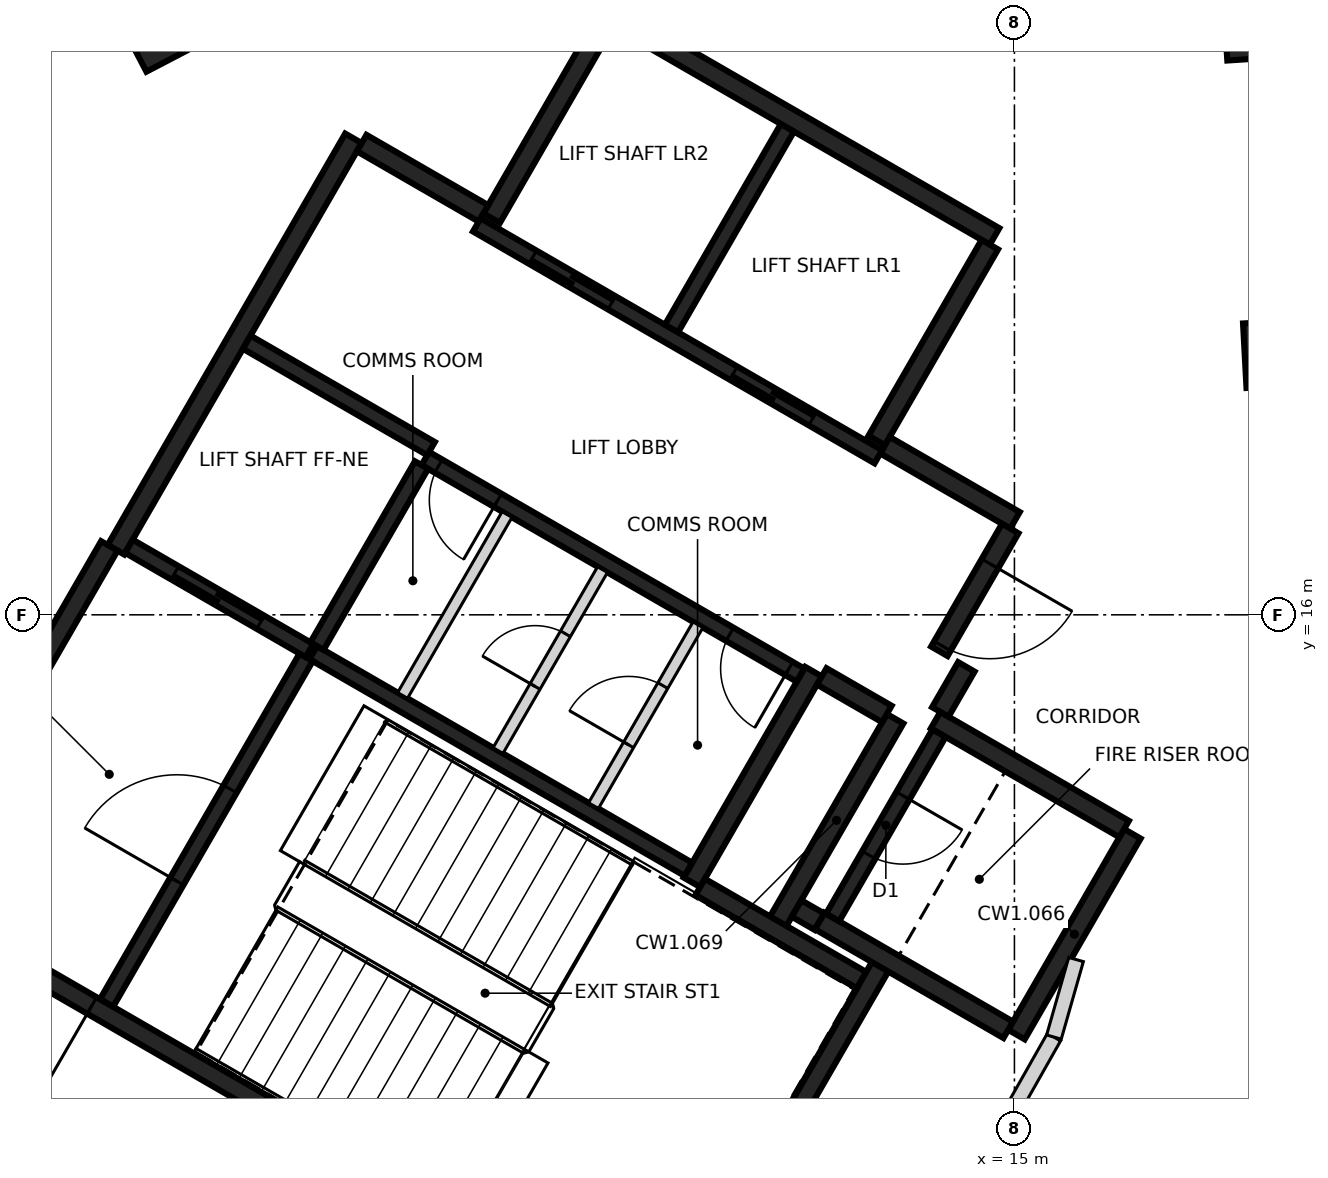
"""IFC4 building model, lengths in metres.
Left out: names, types, materials, properties, quantities, classifications, styles, units other than length and angle.
Written with IfcOpenShell. Run it as: python <this file> out.ifc"""

import sys

from ifc_helpers import new_model, si_unit, direction, frame, frame_2d, origin, origin_2d, place, context, subcontext, project, spatial, rectangle, extrude, element, fill, save


model = new_model("IFC4")
c1 = context("Model", 3, precision=1e-05, world=origin(), true_north=direction((0.0, 1.0)))
c2 = subcontext(c1, "Body", "Model", "MODEL_VIEW")
j1 = project(units=[si_unit("LENGTHUNIT", "METRE"), si_unit("PLANEANGLEUNIT", "RADIAN")], contexts=[c1])
p1 = place(None, origin())
s1 = spatial("IfcSite", under=j1, at=p1, CompositionType="ELEMENT")
p2 = place(p1, origin())
s2 = spatial("IfcBuilding", under=s1, at=p2, CompositionType="ELEMENT")
p3 = place(p2, frame((0.0, 0.0, 139.6)))
s3 = spatial("IfcBuildingStorey", under=s2, at=p3, CompositionType="ELEMENT", Elevation=139.6)
for number, where, z_axis, x_axis in (
    (1, (18.655, 19.442, -0.4), (0.0, 0.0, 1.0), (0.999, 0.054, 0.0)),
    (2, (18.397, 23.757, -0.4), (0.0, 0.0, 1.0), (0.998, 0.065, 0.0)),
    (3, (3.667, 23.896, -0.4), (0.0, 0.0, 1.0), (-0.463, 0.886, 0.0)),
):
    element("IfcColumn", number, at=place(p3, frame(where, z_axis=z_axis, x_axis=x_axis)), inside=s3, PredefinedType="COLUMN", context=c2, shape_type="SweptSolid", body=[
        extrude(rectangle(XDim=1.25, YDim=0.85, at=origin_2d()), origin(), (0.0, 0.0, 1.0), 3.6),
    ])
p4 = place(p3, frame((10.42, 6.498, 0.0), z_axis=(0.0, 0.0, 1.0), x_axis=(-0.866021906294, 0.500006057782, 0.0)))
e4 = element("IfcWall", 4, at=p4, inside=s3, PredefinedType="SHEAR", context=c2, shape_type="SweptSolid", body=[
    extrude(rectangle(XDim=11.55, YDim=0.25, at=frame_2d((5.775, 0.0))), origin(), (0.0, 0.0, 1.0), 3.2),
])
p5 = place(p4, frame((10.025, 0.0, 0.0)))
e5 = element("IfcOpeningElement", 5, at=p5, cuts=e4, PredefinedType="OPENING", context=c2, shape_type="SweptSolid", body=[
    extrude(rectangle(XDim=1.2, YDim=2.1, at=frame_2d((0.6, 1.05))), frame((0.0, 0.135, 0.0), z_axis=(0.0, -1.0, 0.0), x_axis=(1.0, 0.0, 0.0)), (0.0, 0.0, 1.0), 0.27),
])
p6 = place(p4, frame((8.725, 0.0, 0.0)))
e6 = element("IfcOpeningElement", 6, at=p6, cuts=e4, PredefinedType="OPENING", context=c2, shape_type="SweptSolid", body=[
    extrude(rectangle(XDim=1.2, YDim=2.1, at=frame_2d((0.6, 1.05))), frame((0.0, 0.135, 0.0), z_axis=(0.0, -1.0, 0.0), x_axis=(1.0, 0.0, 0.0)), (0.0, 0.0, 1.0), 0.27),
])
p7 = place(p3, frame((3.179, 16.856, 0.0), z_axis=(0.0, 0.0, 1.0), x_axis=(0.500004234368, 0.866022959057, 0.0)))
e7 = element("IfcWall", 7, at=p7, inside=s3, PredefinedType="SHEAR", context=c2, shape_type="SweptSolid", body=[
    extrude(rectangle(XDim=6.25, YDim=0.25, at=frame_2d((3.125, 0.0))), origin(), (0.0, 0.0, 1.0), 3.2),
])
p8 = place(p3, frame((9.673, 23.903, 0.0), z_axis=(0.0, 0.0, 1.0), x_axis=(0.86603616409, -0.499981362141, 0.0)))
e8 = element("IfcWall", 8, at=p8, inside=s3, PredefinedType="SHEAR", context=c2, shape_type="SweptSolid", body=[
    extrude(rectangle(XDim=5.85, YDim=0.25, at=frame_2d((2.925, 0.0))), origin(), (0.0, 0.0, 1.0), 3.2),
])
p9 = place(p3, frame((0.48, 12.381, 0.0), z_axis=(0.0, 0.0, 1.0), x_axis=(0.49999885962, 0.866026062182, 0.0)))
e9 = element("IfcWall", 9, at=p9, inside=s3, PredefinedType="SHEAR", context=c2, shape_type="SweptSolid", body=[
    extrude(rectangle(XDim=5.225, YDim=0.25, at=frame_2d((2.612, 0.0))), origin(), (0.0, 0.0, 1.0), 3.2),
])
p10 = place(p3, frame((13.238, 11.378, 0.0), z_axis=(0.0, 0.0, 1.0), x_axis=(-0.500008851346, -0.866020293397, 0.0)))
e10 = element("IfcWall", 10, at=p10, inside=s3, PredefinedType="SHEAR", context=c2, shape_type="SweptSolid", body=[
    extrude(rectangle(XDim=5.51, YDim=0.25, at=frame_2d((2.755, 0.0))), origin(), (0.0, 0.0, 1.0), 3.2),
])
p11 = place(p3, frame((12.357, 15.252, 0.0), z_axis=(0.0, 0.0, 1.0), x_axis=(-0.500028443584, -0.866008981251, 0.0)))
e11 = element("IfcWall", 11, at=p11, inside=s3, PredefinedType="SHEAR", context=c2, shape_type="SweptSolid", body=[
    extrude(rectangle(XDim=3.2, YDim=0.25, at=frame_2d((1.6, 0.0))), origin(), (0.0, 0.0, 1.0), 3.2),
])
for number, where, z_axis, x_axis in (
    (12, (8.123, 21.219, 0.0), (0.0, 0.0, 1.0), (0.5, 0.866, 0.0)),
    (13, (14.676, 20.87, 0.0), (0.0, 0.0, 1.0), (-0.5, -0.866, 0.0)),
):
    element("IfcWall", number, at=place(p3, frame(where, z_axis=z_axis, x_axis=x_axis)), inside=s3, PredefinedType="SHEAR", context=c2, shape_type="SweptSolid", body=[
        extrude(rectangle(XDim=2.975, YDim=0.25, at=frame_2d((1.487, 0.0))), origin(), (0.0, 0.0, 1.0), 3.2),
    ])
p12 = place(p3, frame((16.552, 13.119, 0.0), z_axis=(0.0, 0.0, 1.0), x_axis=(-0.499978833458, -0.866037623948, 0.0)))
e14 = element("IfcWall", 14, at=p12, inside=s3, PredefinedType="SHEAR", context=c2, shape_type="SweptSolid", body=[
    extrude(rectangle(XDim=3.05, YDim=0.25, at=frame_2d((1.525, 0.0))), origin(), (0.0, 0.0, 1.0), 3.2),
])
p13 = place(p3, frame((14.918, 10.54, 0.0), z_axis=(0.0, 0.0, 1.0), x_axis=(-0.866063538972, 0.499933942099, 0.0)))
e15 = element("IfcWall", 15, at=p13, inside=s3, PredefinedType="SHEAR", context=c2, shape_type="SweptSolid", body=[
    extrude(rectangle(XDim=2.865, YDim=0.25, at=frame_2d((1.432, 0.0))), origin(), (0.0, 0.0, 1.0), 3.2),
])
p14 = place(p3, frame((13.963, 14.614, 0.0), z_axis=(0.0, 0.0, 1.0), x_axis=(0.866042235819, -0.499970844928, 0.0)))
e16 = element("IfcWall", 16, at=p14, inside=s3, PredefinedType="SHEAR", context=c2, shape_type="SweptSolid", body=[
    extrude(rectangle(XDim=2.865, YDim=0.25, at=frame_2d((1.432, 0.0))), origin(), (0.0, 0.0, 1.0), 3.2),
])
p15 = place(p3, frame((11.888, 11.961, 0.0), z_axis=(0.0, 0.0, 1.0), x_axis=(0.500003324108, 0.866023484601, 0.0)))
e17 = element("IfcWall", 17, at=p15, inside=s3, PredefinedType="SHEAR", context=c2, shape_type="SweptSolid", body=[
    extrude(rectangle(XDim=3.085, YDim=0.25, at=frame_2d((1.542, 0.0))), origin(), (0.0, 0.0, 1.0), 3.2),
])
p16 = place(p3, frame((10.865, 12.418, 0.0), z_axis=(0.0, 0.0, 1.0), x_axis=(0.866026229868, -0.499998569178, 0.0)))
e18 = element("IfcWall", 18, at=p16, inside=s3, PredefinedType="SHEAR", context=c2, shape_type="SweptSolid", body=[
    extrude(rectangle(XDim=2.449, YDim=0.25, at=frame_2d((1.225, 0.0))), origin(), (0.0, 0.0, 1.0), 3.2),
])
p17 = place(p3, frame((13.297, 18.231, 0.0), z_axis=(0.0, 0.0, 1.0), x_axis=(0.866043531843, -0.499968599967, 0.0)))
e19 = element("IfcWall", 19, at=p17, inside=s3, PredefinedType="SHEAR", context=c2, shape_type="SweptSolid", body=[
    extrude(rectangle(XDim=1.975, YDim=0.25, at=frame_2d((0.987, 0.0))), origin(), (0.0, 0.0, 1.0), 3.2),
])
p18 = place(p3, frame((6.413, 22.206, 0.0), z_axis=(0.0, 0.0, 1.0), x_axis=(0.866016279763, -0.500015802937, 0.0)))
e20 = element("IfcWall", 20, at=p18, inside=s3, PredefinedType="SHEAR", context=c2, shape_type="SweptSolid", body=[
    extrude(rectangle(XDim=1.849, YDim=0.25, at=frame_2d((0.925, 0.0))), origin(), (0.0, 0.0, 1.0), 3.2),
])
p19 = place(p3, frame((14.945, 17.135, 0.0), z_axis=(0.0, 0.0, 1.0), x_axis=(-0.499983108224, -0.866035156036, 0.0)))
e21 = element("IfcWall", 21, at=p19, inside=s3, PredefinedType="SHEAR", context=c2, shape_type="SweptSolid", body=[
    extrude(rectangle(XDim=1.865, YDim=0.25, at=frame_2d((0.932, 0.0))), origin(), (0.0, 0.0, 1.0), 3.2),
])
p20 = place(p19, frame((0.535, 0.0, 0.0)))
e22 = element("IfcOpeningElement", 22, at=p20, cuts=e21, PredefinedType="OPENING", context=c2, shape_type="SweptSolid", body=[
    extrude(rectangle(XDim=1.25, YDim=2.1, at=frame_2d((0.625, 1.05))), frame((0.0, 0.135, 0.0), z_axis=(0.0, -1.0, 0.0), x_axis=(1.0, 0.0, 0.0)), (0.0, 0.0, 1.0), 0.27),
])
p21 = place(p3, frame((13.322, 14.695, 0.0), z_axis=(0.0, 0.0, 1.0), x_axis=(-0.866017078145, 0.500014420154, 0.0)))
e23 = element("IfcWall", 23, at=p21, inside=s3, PredefinedType="SHEAR", context=c2, shape_type="SweptSolid", body=[
    extrude(rectangle(XDim=0.989, YDim=0.25, at=frame_2d((0.495, 0.0))), origin(), (0.0, 0.0, 1.0), 3.2),
])
p22 = place(p3, frame((14.368, 15.315, 0.0), z_axis=(0.0, 0.0, 1.0), x_axis=(-0.499897359611, -0.866084655132, 0.0)))
e24 = element("IfcWall", 24, at=p22, inside=s3, PredefinedType="SHEAR", context=c2, shape_type="SweptSolid", body=[
    extrude(rectangle(XDim=0.685, YDim=0.25, at=frame_2d((0.342, 0.0))), origin(), (0.0, 0.0, 1.0), 3.2),
])
p23 = place(p3, frame((12.433, 11.964, 0.0), z_axis=(0.0, 0.0, 1.0), x_axis=(-0.866055875208, 0.499947218231, 0.0)))
e25 = element("IfcWall", 25, at=p23, inside=s3, PredefinedType="SHEAR", context=c2, shape_type="SweptSolid", body=[
    extrude(rectangle(XDim=0.345, YDim=0.25, at=frame_2d((0.172, 0.0))), origin(), (0.0, 0.0, 1.0), 3.2),
])
p24 = place(p3, frame((13.21, 18.08, 0.0), z_axis=(0.0, 0.0, 1.0), x_axis=(-0.866030299012, 0.499991521122, 0.0)))
e26 = element("IfcWall", 26, at=p24, inside=s3, PredefinedType="SHEAR", context=c2, shape_type="SweptSolid", body=[
    extrude(rectangle(XDim=6.1, YDim=0.2, at=frame_2d((3.05, 0.0))), origin(), (0.0, 0.0, 1.0), 3.2),
])
p25 = place(p24, frame((1.0, 0.0, 0.0)))
e27 = element("IfcOpeningElement", 27, at=p25, cuts=e26, PredefinedType="OPENING", context=c2, shape_type="SweptSolid", body=[
    extrude(rectangle(XDim=1.2, YDim=2.1, at=frame_2d((0.6, 1.05))), frame((0.0, 0.11, 0.0), z_axis=(0.0, -1.0, 0.0), x_axis=(1.0, 0.0, 0.0)), (0.0, 0.0, 1.0), 0.22),
])
p26 = place(p24, frame((4.05, 0.0, 0.0)))
e28 = element("IfcOpeningElement", 28, at=p26, cuts=e26, PredefinedType="OPENING", context=c2, shape_type="SweptSolid", body=[
    extrude(rectangle(XDim=1.2, YDim=2.1, at=frame_2d((0.6, 1.05))), frame((0.0, 0.11, 0.0), z_axis=(0.0, -1.0, 0.0), x_axis=(1.0, 0.0, 0.0)), (0.0, 0.0, 1.0), 0.22),
])
p27 = place(p3, frame((5.775, 15.502, 0.0), z_axis=(0.0, 0.0, 1.0), x_axis=(0.866020080793, -0.500009219579, 0.0)))
e29 = element("IfcWall", 29, at=p27, inside=s3, PredefinedType="SHEAR", context=c2, shape_type="SweptSolid", body=[
    extrude(rectangle(XDim=5.699, YDim=0.2, at=frame_2d((2.85, 0.0))), origin(), (0.0, 0.0, 1.0), 3.2),
])
p28 = place(p3, frame((12.185, 15.207, 0.0), z_axis=(0.0, 0.0, 1.0), x_axis=(-0.866020080793, 0.500009219579, 0.0)))
e30 = element("IfcWall", 30, at=p28, inside=s3, PredefinedType="SHEAR", context=c2, shape_type="SweptSolid", body=[
    extrude(rectangle(XDim=5.699, YDim=0.2, at=frame_2d((2.85, 0.0))), origin(), (0.0, 0.0, 1.0), 3.2),
])
p29 = place(p28, frame((0.174, 0.0, 0.0)))
e31 = element("IfcOpeningElement", 31, at=p29, cuts=e30, PredefinedType="OPENING", context=c2, shape_type="SweptSolid", body=[
    extrude(rectangle(XDim=0.9, YDim=2.1, at=frame_2d((0.45, 1.05))), frame((0.0, 0.11, 0.0), z_axis=(0.0, -1.0, 0.0), x_axis=(1.0, 0.0, 0.0)), (0.0, 0.0, 1.0), 0.22),
])
p30 = place(p28, frame((4.599, 0.0, 0.0)))
e32 = element("IfcOpeningElement", 32, at=p30, cuts=e30, PredefinedType="OPENING", context=c2, shape_type="SweptSolid", body=[
    extrude(rectangle(XDim=0.9, YDim=2.1, at=frame_2d((0.45, 1.05))), frame((0.0, 0.11, 0.0), z_axis=(0.0, -1.0, 0.0), x_axis=(1.0, 0.0, 0.0)), (0.0, 0.0, 1.0), 0.22),
])
p31 = place(p3, frame((3.057, 10.895, 0.0), z_axis=(0.0, 0.0, 1.0), x_axis=(0.499989418164, 0.866031513124, 0.0)))
e33 = element("IfcWall", 33, at=p31, inside=s3, PredefinedType="SHEAR", context=c2, shape_type="SweptSolid", body=[
    extrude(rectangle(XDim=5.251, YDim=0.2, at=frame_2d((2.625, 0.0))), origin(), (0.0, 0.0, 1.0), 3.2),
])
p32 = place(p31, frame((1.849, 0.0, 0.0)))
e34 = element("IfcOpeningElement", 34, at=p32, cuts=e33, PredefinedType="OPENING", context=c2, shape_type="SweptSolid", body=[
    extrude(rectangle(XDim=1.4, YDim=2.1, at=frame_2d((0.7, 1.05))), frame((0.0, 0.11, 0.0), z_axis=(0.0, -1.0, 0.0), x_axis=(1.0, 0.0, 0.0)), (0.0, 0.0, 1.0), 0.22),
])
p33 = place(p3, frame((10.489, 19.767, 0.0), z_axis=(0.0, 0.0, 1.0), x_axis=(0.499946628782, 0.866056215479, 0.0)))
e35 = element("IfcWall", 35, at=p33, inside=s3, PredefinedType="SHEAR", context=c2, shape_type="SweptSolid", body=[
    extrude(rectangle(XDim=3.048, YDim=0.2, at=frame_2d((1.524, 0.0))), origin(), (0.0, 0.0, 1.0), 3.2),
])
p34 = place(p3, frame((14.008, 14.442, 0.0), z_axis=(0.0, 0.0, 1.0), x_axis=(-0.499986818241, -0.866033014143, 0.0)))
e36 = element("IfcWall", 36, at=p34, inside=s3, PredefinedType="SHEAR", context=c2, shape_type="SweptSolid", body=[
    extrude(rectangle(XDim=2.798, YDim=0.2, at=frame_2d((1.399, 0.0))), origin(), (0.0, 0.0, 1.0), 3.2),
])
p35 = place(p34, frame((0.949, 0.0, 0.0)))
e37 = element("IfcOpeningElement", 37, at=p35, cuts=e36, PredefinedType="OPENING", context=c2, shape_type="SweptSolid", body=[
    extrude(rectangle(XDim=0.9, YDim=2.1, at=frame_2d((0.45, 1.05))), frame((0.0, 0.11, 0.0), z_axis=(0.0, -1.0, 0.0), x_axis=(1.0, 0.0, 0.0)), (0.0, 0.0, 1.0), 0.22),
])
p36 = place(p3, frame((7.199, 17.97, 0.0), z_axis=(0.0, 0.0, 1.0), x_axis=(-0.499968400327, -0.866043647095, 0.0)))
e38 = element("IfcWall", 38, at=p36, inside=s3, PredefinedType="SHEAR", context=c2, shape_type="SweptSolid", body=[
    extrude(rectangle(XDim=2.75, YDim=0.2, at=frame_2d((1.375, 0.0))), origin(), (0.0, 0.0, 1.0), 3.2),
])
p37 = place(p3, frame((5.725, 15.531, 0.0), z_axis=(0.0, 0.0, 1.0), x_axis=(-0.866037306777, 0.499979382845, 0.0)))
e39 = element("IfcWall", 39, at=p37, inside=s3, PredefinedType="SHEAR", context=c2, shape_type="SweptSolid", body=[
    extrude(rectangle(XDim=2.742, YDim=0.2, at=frame_2d((1.371, 0.0))), origin(), (0.0, 0.0, 1.0), 3.2),
])
p38 = place(p37, frame((0.743, 0.0, 0.0)))
e40 = element("IfcOpeningElement", 40, at=p38, cuts=e39, PredefinedType="OPENING", context=c2, shape_type="SweptSolid", body=[
    extrude(rectangle(XDim=1.3, YDim=2.1, at=frame_2d((0.65, 1.05))), frame((0.0, 0.11, 0.0), z_axis=(0.0, -1.0, 0.0), x_axis=(1.0, 0.0, 0.0)), (0.0, 0.0, 1.0), 0.22),
])
p39 = place(p3, frame((4.901, 19.586, 0.0), z_axis=(0.0, 0.0, 1.0), x_axis=(0.866022890907, -0.500004352405, 0.0)))
e41 = element("IfcWall", 41, at=p39, inside=s3, PredefinedType="SHEAR", context=c2, shape_type="SweptSolid", body=[
    extrude(rectangle(XDim=2.799, YDim=0.2, at=frame_2d((1.399, 0.0))), origin(), (0.0, 0.0, 1.0), 3.2),
])
p40 = place(p3, frame((9.462, 13.489, 0.0), z_axis=(0.0, 0.0, 1.0), x_axis=(0.50002746344, 0.86600954718, 0.0)))
e42 = element("IfcWall", 42, at=p40, inside=s3, PredefinedType="PARTITIONING", context=c2, shape_type="SweptSolid", body=[
    extrude(rectangle(XDim=2.748, YDim=0.15, at=frame_2d((1.374, 0.0))), origin(), (0.0, 0.0, 1.0), 3.2),
])
p41 = place(p40, frame((0.924, 0.0, 0.0)))
e43 = element("IfcOpeningElement", 43, at=p41, cuts=e42, PredefinedType="OPENING", context=c2, shape_type="SweptSolid", body=[
    extrude(rectangle(XDim=0.9, YDim=2.1, at=frame_2d((0.45, 1.05))), frame((0.0, 0.085, 0.0), z_axis=(0.0, -1.0, 0.0), x_axis=(1.0, 0.0, 0.0)), (0.0, 0.0, 1.0), 0.17),
])
p42 = place(p3, frame((8.207, 14.214, 0.0), z_axis=(0.0, 0.0, 1.0), x_axis=(0.499922376475, 0.866070215109, 0.0)))
e44 = element("IfcWall", 44, at=p42, inside=s3, PredefinedType="PARTITIONING", context=c2, shape_type="SweptSolid", body=[
    extrude(rectangle(XDim=2.749, YDim=0.15, at=frame_2d((1.374, 0.0))), origin(), (0.0, 0.0, 1.0), 3.2),
])
p43 = place(p42, frame((0.974, 0.0, 0.0)))
e45 = element("IfcOpeningElement", 45, at=p43, cuts=e44, PredefinedType="OPENING", context=c2, shape_type="SweptSolid", body=[
    extrude(rectangle(XDim=0.8, YDim=2.1, at=frame_2d((0.4, 1.05))), frame((0.0, 0.085, 0.0), z_axis=(0.0, -1.0, 0.0), x_axis=(1.0, 0.0, 0.0)), (0.0, 0.0, 1.0), 0.17),
])
p44 = place(p3, frame((6.951, 14.939, 0.0), z_axis=(0.0, 0.0, 1.0), x_axis=(0.50002746344, 0.86600954718, 0.0)))
e46 = element("IfcWall", 46, at=p44, inside=s3, PredefinedType="PARTITIONING", context=c2, shape_type="SweptSolid", body=[
    extrude(rectangle(XDim=2.748, YDim=0.15, at=frame_2d((1.374, 0.0))), origin(), (0.0, 0.0, 1.0), 3.2),
])
p45 = place(p3, frame((12.433, 4.992, 0.0), z_axis=(0.0, 0.0, 1.0), x_axis=(0.492740203499, 0.870176471675, 0.0)))
e47 = element("IfcWall", 47, at=p45, inside=s3, PredefinedType="PARTITIONING", context=c2, shape_type="SweptSolid", body=[
    extrude(rectangle(XDim=6.265, YDim=0.2, at=frame_2d((3.133, 0.0))), origin(), (0.0, 0.0, 1.0), 3.2),
])
p46 = place(p45, frame((2.858, 0.0, 0.0)))
e48 = element("IfcOpeningElement", 48, at=p46, cuts=e47, PredefinedType="OPENING", context=c2, shape_type="SweptSolid", body=[
    extrude(rectangle(XDim=1.0, YDim=2.1, at=frame_2d((0.5, 1.05))), frame((0.0, 0.11, 0.0), z_axis=(0.0, -1.0, 0.0), x_axis=(1.0, 0.0, 0.0)), (0.0, 0.0, 1.0), 0.22),
])
p47 = place(p3, frame((15.52, 10.445, 0.0), z_axis=(0.0, 0.0, 1.0), x_axis=(0.274143458758, 0.961688808306, 0.0)))
e49 = element("IfcWall", 49, at=p47, inside=s3, PredefinedType="PARTITIONING", context=c2, shape_type="SweptSolid", body=[
    extrude(rectangle(XDim=1.061, YDim=0.2, at=frame_2d((0.53, 0.0))), origin(), (0.0, 0.0, 1.0), 3.2),
])
p48 = place(p38, origin())
e50 = element("IfcDoor", 50, at=p48, inside=s3, OperationType="SLIDING_TO_RIGHT", PredefinedType="DOOR", context=c2, shape_type="SweptSolid", body=[
    extrude(rectangle(XDim=1.3, YDim=2.1, at=frame_2d((0.65, 1.05))), frame((0.0, 0.025, 0.0), z_axis=(0.0, -1.0, 0.0), x_axis=(1.0, 0.0, 0.0)), (0.0, 0.0, 1.0), 0.05),
])
fill(e40, e50)
p49 = place(p25, origin())
e51 = element("IfcDoor", 51, at=p49, inside=s3, OperationType="DOUBLE_DOOR_SLIDING", PredefinedType="DOOR", context=c2, shape_type="SweptSolid", body=[
    extrude(rectangle(XDim=1.2, YDim=2.1, at=frame_2d((0.6, 1.05))), frame((0.0, 0.025, 0.0), z_axis=(0.0, -1.0, 0.0), x_axis=(1.0, 0.0, 0.0)), (0.0, 0.0, 1.0), 0.05),
])
fill(e27, e51)
p50 = place(p26, origin())
e52 = element("IfcDoor", 52, at=p50, inside=s3, OperationType="DOUBLE_DOOR_SLIDING", PredefinedType="DOOR", context=c2, shape_type="SweptSolid", body=[
    extrude(rectangle(XDim=1.2, YDim=2.1, at=frame_2d((0.6, 1.05))), frame((0.0, 0.025, 0.0), z_axis=(0.0, -1.0, 0.0), x_axis=(1.0, 0.0, 0.0)), (0.0, 0.0, 1.0), 0.05),
])
fill(e28, e52)
p51 = place(p20, origin())
e53 = element("IfcDoor", 53, at=p51, inside=s3, OperationType="SINGLE_SWING_LEFT", PredefinedType="DOOR", context=c2, shape_type="SweptSolid", body=[
    extrude(rectangle(XDim=1.25, YDim=2.1, at=frame_2d((0.625, 1.05))), frame((0.0, 0.025, 0.0), z_axis=(0.0, -1.0, 0.0), x_axis=(1.0, 0.0, 0.0)), (0.0, 0.0, 1.0), 0.05),
])
fill(e22, e53)
p52 = place(p6, origin())
e54 = element("IfcDoor", 54, at=p52, inside=s3, OperationType="SINGLE_SWING_RIGHT", PredefinedType="DOOR", context=c2, shape_type="SweptSolid", body=[
    extrude(rectangle(XDim=1.2, YDim=2.1, at=frame_2d((0.6, 1.05))), frame((0.0, 0.025, 0.0), z_axis=(0.0, -1.0, 0.0), x_axis=(1.0, 0.0, 0.0)), (0.0, 0.0, 1.0), 0.05),
])
fill(e6, e54)
p53 = place(p32, origin())
e55 = element("IfcDoor", 55, at=p53, inside=s3, OperationType="SINGLE_SWING_RIGHT", PredefinedType="DOOR", context=c2, shape_type="SweptSolid", body=[
    extrude(rectangle(XDim=1.4, YDim=2.1, at=frame_2d((0.7, 1.05))), frame((0.0, 0.025, 0.0), z_axis=(0.0, -1.0, 0.0), x_axis=(1.0, 0.0, 0.0)), (0.0, 0.0, 1.0), 0.05),
])
fill(e34, e55)
p54 = place(p29, origin())
e56 = element("IfcDoor", 56, at=p54, inside=s3, OperationType="SINGLE_SWING_LEFT", PredefinedType="DOOR", context=c2, shape_type="SweptSolid", body=[
    extrude(rectangle(XDim=0.9, YDim=2.1, at=frame_2d((0.45, 1.05))), frame((0.0, 0.025, 0.0), z_axis=(0.0, -1.0, 0.0), x_axis=(1.0, 0.0, 0.0)), (0.0, 0.0, 1.0), 0.05),
])
fill(e31, e56)
p55 = place(p41, origin())
e57 = element("IfcDoor", 57, at=p55, inside=s3, OperationType="SINGLE_SWING_RIGHT", PredefinedType="DOOR", context=c2, shape_type="SweptSolid", body=[
    extrude(rectangle(XDim=0.9, YDim=2.1, at=frame_2d((0.45, 1.05))), frame((0.0, 0.025, 0.0), z_axis=(0.0, -1.0, 0.0), x_axis=(1.0, 0.0, 0.0)), (0.0, 0.0, 1.0), 0.05),
])
fill(e43, e57)
p56 = place(p43, origin())
e58 = element("IfcDoor", 58, at=p56, inside=s3, OperationType="SINGLE_SWING_LEFT", PredefinedType="DOOR", context=c2, shape_type="SweptSolid", body=[
    extrude(rectangle(XDim=0.8, YDim=2.1, at=frame_2d((0.4, 1.05))), frame((0.0, 0.025, 0.0), z_axis=(0.0, -1.0, 0.0), x_axis=(1.0, 0.0, 0.0)), (0.0, 0.0, 1.0), 0.05),
])
fill(e45, e58)
p57 = place(p30, origin())
e59 = element("IfcDoor", 59, at=p57, inside=s3, OperationType="SINGLE_SWING_RIGHT", PredefinedType="DOOR", context=c2, shape_type="SweptSolid", body=[
    extrude(rectangle(XDim=0.9, YDim=2.1, at=frame_2d((0.45, 1.05))), frame((0.0, 0.025, 0.0), z_axis=(0.0, -1.0, 0.0), x_axis=(1.0, 0.0, 0.0)), (0.0, 0.0, 1.0), 0.05),
])
fill(e32, e59)
p58 = place(p35, origin())
e60 = element("IfcDoor", 60, at=p58, inside=s3, OperationType="SINGLE_SWING_LEFT", PredefinedType="DOOR", context=c2, shape_type="SweptSolid", body=[
    extrude(rectangle(XDim=0.9, YDim=2.1, at=frame_2d((0.45, 1.05))), frame((0.0, 0.025, 0.0), z_axis=(0.0, -1.0, 0.0), x_axis=(1.0, 0.0, 0.0)), (0.0, 0.0, 1.0), 0.05),
])
fill(e37, e60)
save(model, sys.argv[1])
